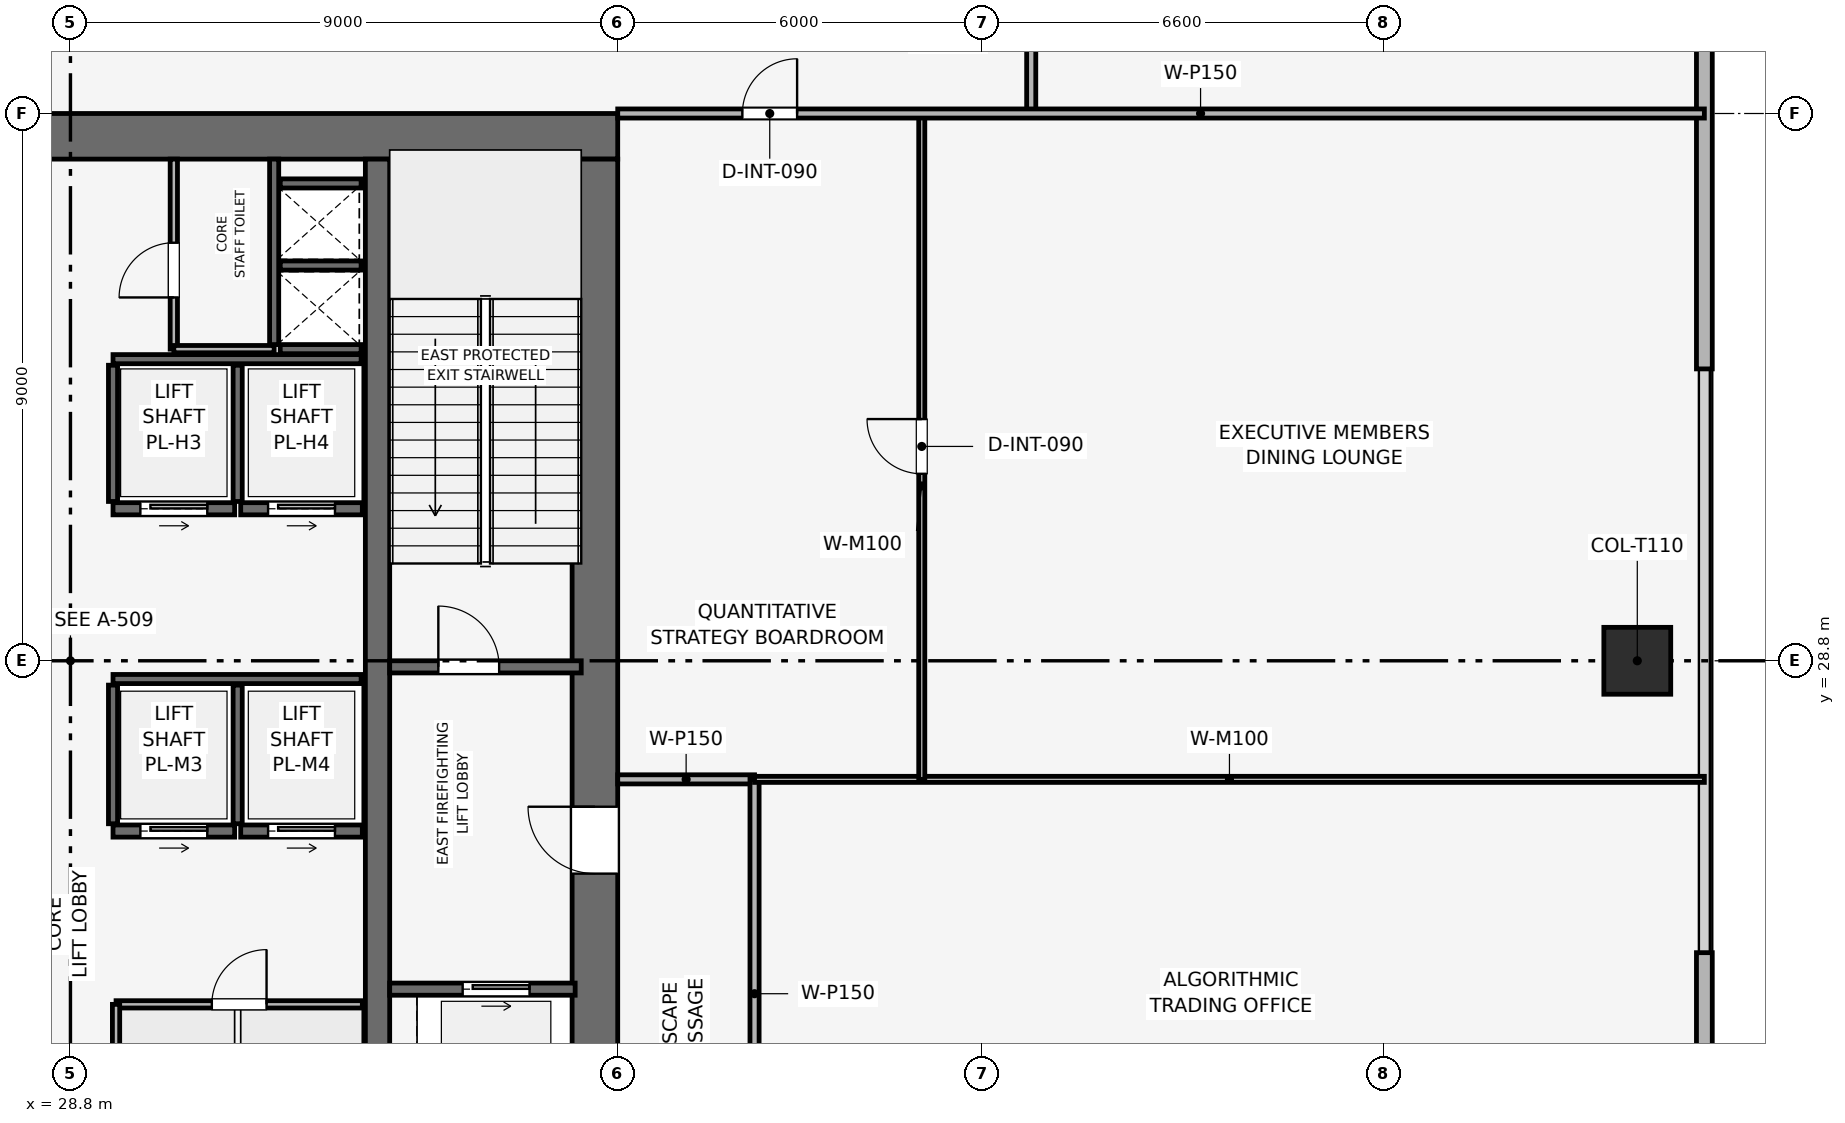
"""IFC4 building model, lengths in metres.
Left out: names, types, materials, properties, quantities, classifications, styles, units other than length and angle.
Written with IfcOpenShell. Run it as: python <this file> out.ifc"""

import sys

from ifc_helpers import new_model, si_unit, direction, frame, frame_2d, origin, origin_2d, place, context, subcontext, project, spatial, rectangle, extrude, element, fill, save


model = new_model("IFC4")
c1 = context("Model", 3, precision=1e-05, world=origin(), true_north=direction((0.0, 1.0)))
c2 = subcontext(c1, "Body", "Model", "MODEL_VIEW")
j1 = project(units=[si_unit("LENGTHUNIT", "METRE"), si_unit("PLANEANGLEUNIT", "RADIAN")], contexts=[c1])
p1 = place(None, origin())
s1 = spatial("IfcSite", under=j1, at=p1, CompositionType="ELEMENT")
p2 = place(p1, origin())
s2 = spatial("IfcBuilding", under=s1, at=p2, CompositionType="ELEMENT")
p3 = place(p2, frame((0.0, 0.0, 241.2)))
s3 = spatial("IfcBuildingStorey", under=s2, at=p3, CompositionType="ELEMENT", Elevation=241.2)
p4 = place(p3, frame((19.8, 37.425, 0.0), z_axis=(0.0, 0.0, 1.0), x_axis=(1.0, 0.0, 0.0)))
e1 = element("IfcWall", 1, at=p4, inside=s3, PredefinedType="SHEAR", context=c2, shape_type="SweptSolid", body=[
    extrude(rectangle(XDim=18.0, YDim=0.75, at=frame_2d((9.0, 0.0))), origin(), (0.0, 0.0, 1.0), 5.4),
])
p5 = place(p4, frame((7.05, 0.0, 0.0)))
e2 = element("IfcOpeningElement", 2, at=p5, cuts=e1, PredefinedType="OPENING", context=c2, shape_type="SweptSolid", body=[
    extrude(rectangle(XDim=1.1, YDim=2.15, at=frame_2d((0.55, 1.075))), frame((0.0, 0.385, 0.0), z_axis=(0.0, -1.0, 0.0), x_axis=(1.0, 0.0, 0.0)), (0.0, 0.0, 1.0), 0.77),
])
p6 = place(p3, frame((37.425, 20.55, 0.0), z_axis=(0.0, 0.0, 1.0), x_axis=(0.0, 1.0, 0.0)))
e3 = element("IfcWall", 3, at=p6, inside=s3, PredefinedType="SHEAR", context=c2, shape_type="SweptSolid", body=[
    extrude(rectangle(XDim=16.5, YDim=0.75, at=frame_2d((8.25, 0.0))), origin(), (0.0, 0.0, 1.0), 5.4),
])
p7 = place(p6, frame((4.75, 0.0, 0.0)))
e4 = element("IfcOpeningElement", 4, at=p7, cuts=e3, PredefinedType="OPENING", context=c2, shape_type="SweptSolid", body=[
    extrude(rectangle(XDim=1.1, YDim=2.15, at=frame_2d((0.55, 1.075))), frame((0.0, 0.385, 0.0), z_axis=(0.0, -1.0, 0.0), x_axis=(1.0, 0.0, 0.0)), (0.0, 0.0, 1.0), 0.77),
])
p8 = place(p3, frame((33.85, 20.55, 0.0), z_axis=(0.0, 0.0, 1.0), x_axis=(0.0, 1.0, 0.0)))
e5 = element("IfcWall", 5, at=p8, inside=s3, PredefinedType="SHEAR", context=c2, shape_type="SweptSolid", body=[
    extrude(rectangle(XDim=16.5, YDim=0.4, at=frame_2d((8.25, 0.0))), origin(), (0.0, 0.0, 1.0), 5.4),
])
p9 = place(p3, frame((54.567, 28.8, 0.084), z_axis=(-0.362373598567, 0.0, 0.932032925954), x_axis=(0.0, -1.0, 0.0)))
e6 = element("IfcColumn", 6, at=p9, inside=s3, PredefinedType="COLUMN", context=c2, shape_type="SweptSolid", body=[
    extrude(rectangle(XDim=1.1, YDim=1.1, at=origin_2d()), origin(), (0.0, 0.0, 1.0), 5.351),
])
p10 = place(p3, frame((55.67, 48.3, 0.0), z_axis=(0.0, 0.0, 1.0), x_axis=(0.0, -1.0, 0.0)))
e7 = element("IfcWall", 7, at=p10, inside=s3, PredefinedType="SOLIDWALL", context=c2, shape_type="SweptSolid", body=[
    extrude(rectangle(XDim=14.7, YDim=0.26, at=frame_2d((7.35, 0.0))), origin(), (0.0, 0.0, 1.0), 5.15),
])
p11 = place(p10, frame((0.25, 0.0, 0.9)))
e8 = element("IfcOpeningElement", 8, at=p11, cuts=e7, PredefinedType="OPENING", context=c2, shape_type="SweptSolid", body=[
    extrude(rectangle(XDim=2.6, YDim=2.2, at=frame_2d((1.3, 1.1))), frame((0.0, 0.14, 0.0), z_axis=(0.0, -1.0, 0.0), x_axis=(1.0, 0.0, 0.0)), (0.0, 0.0, 1.0), 0.28),
])
p12 = place(p3, frame((55.67, 24.0, 0.0), z_axis=(0.0, 0.0, 1.0), x_axis=(0.0, -1.0, 0.0)))
e9 = element("IfcWall", 9, at=p12, inside=s3, PredefinedType="SOLIDWALL", context=c2, shape_type="SweptSolid", body=[
    extrude(rectangle(XDim=14.7, YDim=0.26, at=frame_2d((7.35, 0.0))), origin(), (0.0, 0.0, 1.0), 5.15),
])
p13 = place(p12, frame((11.85, 0.0, 0.9)))
e10 = element("IfcOpeningElement", 10, at=p13, cuts=e9, PredefinedType="OPENING", context=c2, shape_type="SweptSolid", body=[
    extrude(rectangle(XDim=2.6, YDim=2.2, at=frame_2d((1.3, 1.1))), frame((0.0, 0.14, 0.0), z_axis=(0.0, -1.0, 0.0), x_axis=(1.0, 0.0, 0.0)), (0.0, 0.0, 1.0), 0.28),
])
p14 = place(p3, frame((34.05, 28.7, 0.0), z_axis=(0.0, 0.0, 1.0), x_axis=(1.0, 0.0, 0.0)))
e11 = element("IfcWall", 11, at=p14, inside=s3, PredefinedType="SHEAR", context=c2, shape_type="SweptSolid", body=[
    extrude(rectangle(XDim=3.15, YDim=0.2, at=frame_2d((1.575, 0.0))), origin(), (0.0, 0.0, 1.0), 5.15),
])
p15 = place(p14, frame((0.8, 0.0, 0.0)))
e12 = element("IfcOpeningElement", 12, at=p15, cuts=e11, PredefinedType="OPENING", context=c2, shape_type="SweptSolid", body=[
    extrude(rectangle(XDim=1.0, YDim=2.1, at=frame_2d((0.5, 1.05))), frame((0.0, 0.11, 0.0), z_axis=(0.0, -1.0, 0.0), x_axis=(1.0, 0.0, 0.0)), (0.0, 0.0, 1.0), 0.22),
])
p16 = place(p3, frame((32.15, 34.0, 0.0), z_axis=(0.0, 0.0, 1.0), x_axis=(0.0, 1.0, 0.0)))
e13 = element("IfcWall", 13, at=p16, inside=s3, PredefinedType="SHEAR", context=c2, shape_type="SweptSolid", body=[
    extrude(rectangle(XDim=3.05, YDim=0.15, at=frame_2d((1.525, 0.0))), origin(), (0.0, 0.0, 1.0), 5.15),
])
for number, where, z_axis, x_axis in (
    (14, (32.25, 33.925, 0.0), (0.0, 0.0, 1.0), (1.0, 0.0, 0.0)),
    (15, (32.25, 35.3, 0.0), (0.0, 0.0, 1.0), (1.0, 0.0, 0.0)),
):
    element("IfcWall", number, at=place(p3, frame(where, z_axis=z_axis, x_axis=x_axis)), inside=s3, PredefinedType="SHEAR", context=c2, shape_type="SweptSolid", body=[
        extrude(rectangle(XDim=1.33, YDim=0.15, at=frame_2d((0.665, 0.0))), origin(), (0.0, 0.0, 1.0), 5.15),
    ])
p17 = place(p3, frame((34.05, 23.4, 0.0), z_axis=(0.0, 0.0, 1.0), x_axis=(1.0, 0.0, 0.0)))
e16 = element("IfcWall", 16, at=p17, inside=s3, PredefinedType="SHEAR", context=c2, shape_type="SweptSolid", body=[
    extrude(rectangle(XDim=3.05, YDim=0.2, at=frame_2d((1.525, 0.0))), origin(), (0.0, 0.0, 1.0), 5.15),
])
p18 = place(p17, frame((1.2, 0.0, 0.0)))
e17 = element("IfcOpeningElement", 17, at=p18, cuts=e16, PredefinedType="OPENING", context=c2, shape_type="SweptSolid", body=[
    extrude(rectangle(XDim=1.1, YDim=2.15, at=frame_2d((0.55, 1.075))), frame((0.0, 0.11, 0.0), z_axis=(0.0, -1.0, 0.0), x_axis=(1.0, 0.0, 0.0)), (0.0, 0.0, 1.0), 0.22),
])
p19 = place(p3, frame((29.5, 26.0, 0.0), z_axis=(0.0, 0.0, 1.0), x_axis=(1.0, 0.0, 0.0)))
e18 = element("IfcWall", 18, at=p19, inside=s3, PredefinedType="SHEAR", context=c2, shape_type="SweptSolid", body=[
    extrude(rectangle(XDim=2.0, YDim=0.2, at=frame_2d((1.0, 0.0))), origin(), (0.0, 0.0, 1.0), 5.15),
])
p20 = place(p19, frame((0.45, 0.0, 0.0)))
e19 = element("IfcOpeningElement", 19, at=p20, cuts=e18, PredefinedType="OPENING", context=c2, shape_type="SweptSolid", body=[
    extrude(rectangle(XDim=1.1, YDim=2.15, at=frame_2d((0.55, 1.075))), frame((0.0, 0.11, 0.0), z_axis=(0.0, -1.0, 0.0), x_axis=(1.0, 0.0, 0.0)), (0.0, 0.0, 1.0), 0.22),
])
p21 = place(p3, frame((31.6, 26.0, 0.0), z_axis=(0.0, 0.0, 1.0), x_axis=(1.0, 0.0, 0.0)))
e20 = element("IfcWall", 20, at=p21, inside=s3, PredefinedType="SHEAR", context=c2, shape_type="SweptSolid", body=[
    extrude(rectangle(XDim=2.0, YDim=0.2, at=frame_2d((1.0, 0.0))), origin(), (0.0, 0.0, 1.0), 5.15),
])
p22 = place(p21, frame((0.45, 0.0, 0.0)))
e21 = element("IfcOpeningElement", 21, at=p22, cuts=e20, PredefinedType="OPENING", context=c2, shape_type="SweptSolid", body=[
    extrude(rectangle(XDim=1.1, YDim=2.15, at=frame_2d((0.55, 1.075))), frame((0.0, 0.11, 0.0), z_axis=(0.0, -1.0, 0.0), x_axis=(1.0, 0.0, 0.0)), (0.0, 0.0, 1.0), 0.22),
])
p23 = place(p3, frame((29.5, 31.3, 0.0), z_axis=(0.0, 0.0, 1.0), x_axis=(1.0, 0.0, 0.0)))
e22 = element("IfcWall", 22, at=p23, inside=s3, PredefinedType="SHEAR", context=c2, shape_type="SweptSolid", body=[
    extrude(rectangle(XDim=2.0, YDim=0.2, at=frame_2d((1.0, 0.0))), origin(), (0.0, 0.0, 1.0), 5.15),
])
p24 = place(p23, frame((0.45, 0.0, 0.0)))
e23 = element("IfcOpeningElement", 23, at=p24, cuts=e22, PredefinedType="OPENING", context=c2, shape_type="SweptSolid", body=[
    extrude(rectangle(XDim=1.1, YDim=2.15, at=frame_2d((0.55, 1.075))), frame((0.0, 0.11, 0.0), z_axis=(0.0, -1.0, 0.0), x_axis=(1.0, 0.0, 0.0)), (0.0, 0.0, 1.0), 0.22),
])
p25 = place(p3, frame((31.6, 31.3, 0.0), z_axis=(0.0, 0.0, 1.0), x_axis=(1.0, 0.0, 0.0)))
e24 = element("IfcWall", 24, at=p25, inside=s3, PredefinedType="SHEAR", context=c2, shape_type="SweptSolid", body=[
    extrude(rectangle(XDim=2.0, YDim=0.2, at=frame_2d((1.0, 0.0))), origin(), (0.0, 0.0, 1.0), 5.15),
])
p26 = place(p25, frame((0.45, 0.0, 0.0)))
e25 = element("IfcOpeningElement", 25, at=p26, cuts=e24, PredefinedType="OPENING", context=c2, shape_type="SweptSolid", body=[
    extrude(rectangle(XDim=1.1, YDim=2.15, at=frame_2d((0.55, 1.075))), frame((0.0, 0.11, 0.0), z_axis=(0.0, -1.0, 0.0), x_axis=(1.0, 0.0, 0.0)), (0.0, 0.0, 1.0), 0.22),
])
p27 = place(p3, frame((32.25, 36.65, 0.0), z_axis=(0.0, 0.0, 1.0), x_axis=(1.0, 0.0, 0.0)))
e26 = element("IfcWall", 26, at=p27, inside=s3, PredefinedType="SHEAR", context=c2, shape_type="SweptSolid", body=[
    extrude(rectangle(XDim=1.33, YDim=0.15, at=frame_2d((0.665, 0.0))), origin(), (0.0, 0.0, 1.0), 5.15),
])
p28 = place(p3, frame((29.5, 28.5, 0.0), z_axis=(0.0, 0.0, 1.0), x_axis=(1.0, 0.0, 0.0)))
e27 = element("IfcWall", 27, at=p28, inside=s3, PredefinedType="SHEAR", context=c2, shape_type="SweptSolid", body=[
    extrude(rectangle(XDim=4.08, YDim=0.15, at=frame_2d((2.04, 0.0))), origin(), (0.0, 0.0, 1.0), 5.15),
])
for number, where, z_axis, x_axis in (
    (28, (29.5, 26.12, 0.0), (0.0, 0.0, 1.0), (0.0, 1.0, 0.0)),
    (29, (31.55, 26.12, 0.0), (0.0, 0.0, 1.0), (0.0, 1.0, 0.0)),
):
    element("IfcWall", number, at=place(p3, frame(where, z_axis=z_axis, x_axis=x_axis)), inside=s3, PredefinedType="SHEAR", context=c2, shape_type="SweptSolid", body=[
        extrude(rectangle(XDim=2.28, YDim=0.15, at=frame_2d((1.14, 0.0))), origin(), (0.0, 0.0, 1.0), 5.15),
    ])
p29 = place(p3, frame((29.5, 33.76, 0.0), z_axis=(0.0, 0.0, 1.0), x_axis=(1.0, 0.0, 0.0)))
e30 = element("IfcWall", 30, at=p29, inside=s3, PredefinedType="SHEAR", context=c2, shape_type="SweptSolid", body=[
    extrude(rectangle(XDim=4.08, YDim=0.15, at=frame_2d((2.04, 0.0))), origin(), (0.0, 0.0, 1.0), 5.15),
])
for number, where, z_axis, x_axis in (
    (31, (29.5, 31.42, 0.0), (0.0, 0.0, 1.0), (0.0, 1.0, 0.0)),
    (32, (31.55, 31.42, 0.0), (0.0, 0.0, 1.0), (0.0, 1.0, 0.0)),
):
    element("IfcWall", number, at=place(p3, frame(where, z_axis=z_axis, x_axis=x_axis)), inside=s3, PredefinedType="SHEAR", context=c2, shape_type="SweptSolid", body=[
        extrude(rectangle(XDim=2.24, YDim=0.15, at=frame_2d((1.12, 0.0))), origin(), (0.0, 0.0, 1.0), 5.15),
    ])
p30 = place(p3, frame((30.5, 33.925, 0.0), z_axis=(0.0, 0.0, 1.0), x_axis=(0.0, 1.0, 0.0)))
e33 = element("IfcWall", 33, at=p30, inside=s3, PredefinedType="PARTITIONING", context=c2, shape_type="SweptSolid", body=[
    extrude(rectangle(XDim=3.125, YDim=0.12, at=frame_2d((1.562, 0.0))), origin(), (0.0, 0.0, 1.0), 5.15),
])
p31 = place(p30, frame((0.85, 0.0, 0.0)))
e34 = element("IfcOpeningElement", 34, at=p31, cuts=e33, PredefinedType="OPENING", context=c2, shape_type="SweptSolid", body=[
    extrude(rectangle(XDim=0.9, YDim=2.1, at=frame_2d((0.45, 1.05))), frame((0.0, 0.07, 0.0), z_axis=(0.0, -1.0, 0.0), x_axis=(1.0, 0.0, 0.0)), (0.0, 0.0, 1.0), 0.14),
])
p32 = place(p3, frame((30.5, 33.925, 0.0), z_axis=(0.0, 0.0, 1.0), x_axis=(1.0, 0.0, 0.0)))
e35 = element("IfcWall", 35, at=p32, inside=s3, PredefinedType="PARTITIONING", context=c2, shape_type="SweptSolid", body=[
    extrude(rectangle(XDim=1.65, YDim=0.12, at=frame_2d((0.825, 0.0))), origin(), (0.0, 0.0, 1.0), 5.15),
])
p33 = place(p3, frame((29.55, 23.15, 0.0), z_axis=(0.0, 0.0, 1.0), x_axis=(1.0, 0.0, 0.0)))
e36 = element("IfcWall", 36, at=p33, inside=s3, PredefinedType="PARTITIONING", context=c2, shape_type="SweptSolid", body=[
    extrude(rectangle(XDim=4.05, YDim=0.12, at=frame_2d((2.025, 0.0))), origin(), (0.0, 0.0, 1.0), 5.15),
])
p34 = place(p33, frame((1.575, 0.0, 0.0)))
e37 = element("IfcOpeningElement", 37, at=p34, cuts=e36, PredefinedType="OPENING", context=c2, shape_type="SweptSolid", body=[
    extrude(rectangle(XDim=0.9, YDim=2.1, at=frame_2d((0.45, 1.05))), frame((0.0, 0.07, 0.0), z_axis=(0.0, -1.0, 0.0), x_axis=(1.0, 0.0, 0.0)), (0.0, 0.0, 1.0), 0.14),
])
p35 = place(p3, frame((29.55, 20.4, 0.0), z_axis=(0.0, 0.0, 1.0), x_axis=(0.0, 1.0, 0.0)))
e38 = element("IfcWall", 38, at=p35, inside=s3, PredefinedType="PARTITIONING", context=c2, shape_type="SweptSolid", body=[
    extrude(rectangle(XDim=2.75, YDim=0.12, at=frame_2d((1.375, 0.0))), origin(), (0.0, 0.0, 1.0), 5.15),
])
p36 = place(p3, frame((37.8, 26.85, 0.0), z_axis=(0.0, 0.0, 1.0), x_axis=(1.0, 0.0, 0.0)))
e39 = element("IfcWall", 39, at=p36, inside=s3, PredefinedType="PARTITIONING", context=c2, shape_type="SweptSolid", body=[
    extrude(rectangle(XDim=2.25, YDim=0.15, at=frame_2d((1.125, 0.0))), origin(), (0.0, 0.0, 1.0), 5.15),
])
p37 = place(p3, frame((40.05, 19.8, 0.0), z_axis=(0.0, 0.0, 1.0), x_axis=(0.0, 1.0, 0.0)))
e40 = element("IfcWall", 40, at=p37, inside=s3, PredefinedType="PARTITIONING", context=c2, shape_type="SweptSolid", body=[
    extrude(rectangle(XDim=7.05, YDim=0.15, at=frame_2d((3.525, 0.0))), origin(), (0.0, 0.0, 1.0), 4.735),
])
p38 = place(p3, frame((40.05, 26.85, 0.0), z_axis=(0.0, 0.0, 1.0), x_axis=(1.0, 0.0, 0.0)))
e41 = element("IfcWall", 41, at=p38, inside=s3, PredefinedType="MOVABLE", context=c2, shape_type="SweptSolid", body=[
    extrude(rectangle(XDim=15.62, YDim=0.1, at=frame_2d((7.81, 0.0))), origin(), (0.0, 0.0, 1.0), 4.735),
])
p39 = place(p3, frame((42.8, 26.85, 0.0), z_axis=(0.0, 0.0, 1.0), x_axis=(0.0, 1.0, 0.0)))
e42 = element("IfcWall", 42, at=p39, inside=s3, PredefinedType="MOVABLE", context=c2, shape_type="SweptSolid", body=[
    extrude(rectangle(XDim=10.95, YDim=0.1, at=frame_2d((5.475, 0.0))), origin(), (0.0, 0.0, 1.0), 4.735),
])
p40 = place(p39, frame((5.025, 0.0, 0.0)))
e43 = element("IfcOpeningElement", 43, at=p40, cuts=e42, PredefinedType="OPENING", context=c2, shape_type="SweptSolid", body=[
    extrude(rectangle(XDim=0.9, YDim=2.1, at=frame_2d((0.45, 1.05))), frame((0.0, 0.06, 0.0), z_axis=(0.0, -1.0, 0.0), x_axis=(1.0, 0.0, 0.0)), (0.0, 0.0, 1.0), 0.12),
])
p41 = place(p3, frame((44.6, 37.8, 0.0), z_axis=(0.0, 0.0, 1.0), x_axis=(0.0, 1.0, 0.0)))
e44 = element("IfcWall", 44, at=p41, inside=s3, PredefinedType="PARTITIONING", context=c2, shape_type="SweptSolid", body=[
    extrude(rectangle(XDim=2.4, YDim=0.15, at=frame_2d((1.2, 0.0))), origin(), (0.0, 0.0, 1.0), 5.15),
])
p42 = place(p3, frame((37.8, 37.8, 0.0), z_axis=(0.0, 0.0, 1.0), x_axis=(1.0, 0.0, 0.0)))
e45 = element("IfcWall", 45, at=p42, inside=s3, PredefinedType="PARTITIONING", context=c2, shape_type="SweptSolid", body=[
    extrude(rectangle(XDim=17.87, YDim=0.15, at=frame_2d((8.935, 0.0))), origin(), (0.0, 0.0, 1.0), 4.735),
])
p43 = place(p42, frame((2.05, 0.0, 0.0)))
e46 = element("IfcOpeningElement", 46, at=p43, cuts=e45, PredefinedType="OPENING", context=c2, shape_type="SweptSolid", body=[
    extrude(rectangle(XDim=0.9, YDim=2.1, at=frame_2d((0.45, 1.05))), frame((0.0, 0.085, 0.0), z_axis=(0.0, -1.0, 0.0), x_axis=(1.0, 0.0, 0.0)), (0.0, 0.0, 1.0), 0.17),
])
p44 = place(p15, origin())
e47 = element("IfcDoor", 47, at=p44, inside=s3, OperationType="SINGLE_SWING_LEFT", PredefinedType="DOOR", context=c2, shape_type="SweptSolid", body=[
    extrude(rectangle(XDim=1.0, YDim=2.1, at=frame_2d((0.5, 1.05))), frame((0.0, 0.025, 0.0), z_axis=(0.0, -1.0, 0.0), x_axis=(1.0, 0.0, 0.0)), (0.0, 0.0, 1.0), 0.05),
])
fill(e12, e47)
p45 = place(p18, origin())
e48 = element("IfcDoor", 48, at=p45, inside=s3, OperationType="SLIDING_TO_RIGHT", PredefinedType="DOOR", context=c2, shape_type="SweptSolid", body=[
    extrude(rectangle(XDim=1.1, YDim=2.15, at=frame_2d((0.55, 1.075))), frame((0.0, 0.025, 0.0), z_axis=(0.0, -1.0, 0.0), x_axis=(1.0, 0.0, 0.0)), (0.0, 0.0, 1.0), 0.05),
])
fill(e17, e48)
p46 = place(p20, origin())
e49 = element("IfcDoor", 49, at=p46, inside=s3, OperationType="SLIDING_TO_RIGHT", PredefinedType="DOOR", context=c2, shape_type="SweptSolid", body=[
    extrude(rectangle(XDim=1.1, YDim=2.15, at=frame_2d((0.55, 1.075))), frame((0.0, 0.025, 0.0), z_axis=(0.0, -1.0, 0.0), x_axis=(1.0, 0.0, 0.0)), (0.0, 0.0, 1.0), 0.05),
])
fill(e19, e49)
p47 = place(p22, origin())
e50 = element("IfcDoor", 50, at=p47, inside=s3, OperationType="SLIDING_TO_RIGHT", PredefinedType="DOOR", context=c2, shape_type="SweptSolid", body=[
    extrude(rectangle(XDim=1.1, YDim=2.15, at=frame_2d((0.55, 1.075))), frame((0.0, 0.025, 0.0), z_axis=(0.0, -1.0, 0.0), x_axis=(1.0, 0.0, 0.0)), (0.0, 0.0, 1.0), 0.05),
])
fill(e21, e50)
p48 = place(p24, origin())
e51 = element("IfcDoor", 51, at=p48, inside=s3, OperationType="SLIDING_TO_RIGHT", PredefinedType="DOOR", context=c2, shape_type="SweptSolid", body=[
    extrude(rectangle(XDim=1.1, YDim=2.15, at=frame_2d((0.55, 1.075))), frame((0.0, 0.025, 0.0), z_axis=(0.0, -1.0, 0.0), x_axis=(1.0, 0.0, 0.0)), (0.0, 0.0, 1.0), 0.05),
])
fill(e23, e51)
p49 = place(p26, origin())
e52 = element("IfcDoor", 52, at=p49, inside=s3, OperationType="SLIDING_TO_RIGHT", PredefinedType="DOOR", context=c2, shape_type="SweptSolid", body=[
    extrude(rectangle(XDim=1.1, YDim=2.15, at=frame_2d((0.55, 1.075))), frame((0.0, 0.025, 0.0), z_axis=(0.0, -1.0, 0.0), x_axis=(1.0, 0.0, 0.0)), (0.0, 0.0, 1.0), 0.05),
])
fill(e25, e52)
p50 = place(p31, origin())
e53 = element("IfcDoor", 53, at=p50, inside=s3, OperationType="SINGLE_SWING_LEFT", PredefinedType="DOOR", context=c2, shape_type="SweptSolid", body=[
    extrude(rectangle(XDim=0.9, YDim=2.1, at=frame_2d((0.45, 1.05))), frame((0.0, 0.025, 0.0), z_axis=(0.0, -1.0, 0.0), x_axis=(1.0, 0.0, 0.0)), (0.0, 0.0, 1.0), 0.05),
])
fill(e34, e53)
p51 = place(p34, origin())
e54 = element("IfcDoor", 54, at=p51, inside=s3, OperationType="SINGLE_SWING_RIGHT", PredefinedType="DOOR", context=c2, shape_type="SweptSolid", body=[
    extrude(rectangle(XDim=0.9, YDim=2.1, at=frame_2d((0.45, 1.05))), frame((0.0, 0.025, 0.0), z_axis=(0.0, -1.0, 0.0), x_axis=(1.0, 0.0, 0.0)), (0.0, 0.0, 1.0), 0.05),
])
fill(e37, e54)
p52 = place(p40, origin())
e55 = element("IfcDoor", 55, at=p52, inside=s3, OperationType="SINGLE_SWING_RIGHT", PredefinedType="DOOR", context=c2, shape_type="SweptSolid", body=[
    extrude(rectangle(XDim=0.9, YDim=2.1, at=frame_2d((0.45, 1.05))), frame((0.0, 0.025, 0.0), z_axis=(0.0, -1.0, 0.0), x_axis=(1.0, 0.0, 0.0)), (0.0, 0.0, 1.0), 0.05),
])
fill(e43, e55)
p53 = place(p43, origin())
e56 = element("IfcDoor", 56, at=p53, inside=s3, OperationType="SINGLE_SWING_RIGHT", PredefinedType="DOOR", context=c2, shape_type="SweptSolid", body=[
    extrude(rectangle(XDim=0.9, YDim=2.1, at=frame_2d((0.45, 1.05))), frame((0.0, 0.025, 0.0), z_axis=(0.0, -1.0, 0.0), x_axis=(1.0, 0.0, 0.0)), (0.0, 0.0, 1.0), 0.05),
])
fill(e46, e56)
p54 = place(p7, origin())
e57 = element("IfcDoor", 57, at=p54, inside=s3, OperationType="SINGLE_SWING_RIGHT", PredefinedType="DOOR", context=c2, shape_type="SweptSolid", body=[
    extrude(rectangle(XDim=1.1, YDim=2.15, at=frame_2d((0.55, 1.075))), frame((0.0, 0.025, 0.0), z_axis=(0.0, -1.0, 0.0), x_axis=(1.0, 0.0, 0.0)), (0.0, 0.0, 1.0), 0.05),
])
fill(e4, e57)
save(model, sys.argv[1])
